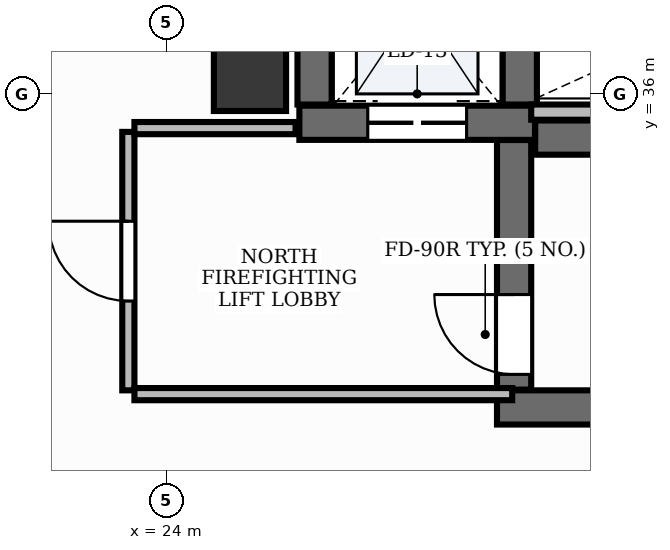
"""IFC4 building model, lengths in metres.
Left out: names, types, materials, properties, quantities, classifications, styles, units other than length and angle.
Written with IfcOpenShell. Run it as: python <this file> out.ifc"""

import sys

from ifc_helpers import new_model, si_unit, direction, frame, frame_2d, origin, origin_2d, place, context, subcontext, project, spatial, rectangle, extrude, element, fill, save


model = new_model("IFC4")
c1 = context("Model", 3, precision=1e-05, world=origin(), true_north=direction((0.0, 1.0)))
c2 = subcontext(c1, "Body", "Model", "MODEL_VIEW")
j1 = project(units=[si_unit("LENGTHUNIT", "METRE"), si_unit("PLANEANGLEUNIT", "RADIAN")], contexts=[c1])
p1 = place(None, origin())
s1 = spatial("IfcSite", under=j1, at=p1, CompositionType="ELEMENT")
p2 = place(p1, origin())
s2 = spatial("IfcBuilding", under=s1, at=p2, CompositionType="ELEMENT")
p3 = place(p2, frame((0.0, 0.0, 30.0)))
s3 = spatial("IfcBuildingStorey", under=s2, at=p3, CompositionType="ELEMENT", Elevation=30.0)
p4 = place(p3, frame((28.852, 35.425, 0.0), z_axis=(0.0, 0.0, 1.0), x_axis=(1.0, 0.0, 0.0)))
e1 = element("IfcWall", 1, at=p4, inside=s3, PredefinedType="SHEAR", context=c2, shape_type="SweptSolid", body=[
    extrude(rectangle(XDim=8.248, YDim=0.45, at=frame_2d((4.124, 0.0))), origin(), (0.0, 0.0, 1.0), 3.9),
])
p5 = place(p3, frame((28.35, 31.875, 0.0), z_axis=(0.0, 0.0, 1.0), x_axis=(1.0, 0.0, 0.0)))
e2 = element("IfcWall", 2, at=p5, inside=s3, PredefinedType="SHEAR", context=c2, shape_type="SweptSolid", body=[
    extrude(rectangle(XDim=8.75, YDim=0.45, at=frame_2d((4.375, 0.0))), origin(), (0.0, 0.0, 1.0), 3.9),
])
p6 = place(p3, frame((28.575, 32.11, 0.0), z_axis=(0.0, 0.0, 1.0), x_axis=(0.0, 1.0, 0.0)))
e3 = element("IfcWall", 3, at=p6, inside=s3, PredefinedType="SHEAR", context=c2, shape_type="SweptSolid", body=[
    extrude(rectangle(XDim=3.283, YDim=0.45, at=frame_2d((1.642, 0.0))), origin(), (0.0, 0.0, 1.0), 3.9),
])
p7 = place(p6, frame((0.2, 0.0, 0.0)))
e4 = element("IfcOpeningElement", 4, at=p7, cuts=e3, PredefinedType="OPENING", context=c2, shape_type="SweptSolid", body=[
    extrude(rectangle(XDim=1.05, YDim=2.15, at=frame_2d((0.525, 1.075))), frame((0.0, 0.24, 0.0), z_axis=(0.0, -1.0, 0.0), x_axis=(1.0, 0.0, 0.0)), (0.0, 0.0, 1.0), 0.48),
])
p8 = place(p3, frame((25.75, 35.62, 0.0), z_axis=(0.0, 0.0, 1.0), x_axis=(1.0, 0.0, 0.0)))
e5 = element("IfcWall", 5, at=p8, inside=s3, PredefinedType="SHEAR", context=c2, shape_type="SweptSolid", body=[
    extrude(rectangle(XDim=3.1, YDim=0.45, at=frame_2d((1.55, 0.0))), origin(), (0.0, 0.0, 1.0), 3.9),
])
p9 = place(p8, frame((0.9, 0.0, 0.0)))
e6 = element("IfcOpeningElement", 6, at=p9, cuts=e5, PredefinedType="OPENING", context=c2, shape_type="SweptSolid", body=[
    extrude(rectangle(XDim=1.3, YDim=2.2, at=frame_2d((0.65, 1.1))), frame((0.0, 0.24, 0.0), z_axis=(0.0, -1.0, 0.0), x_axis=(1.0, 0.0, 0.0)), (0.0, 0.0, 1.0), 0.48),
])
for number, where, z_axis, x_axis in (
    (7, (25.95, 35.86, 0.0), (0.0, 0.0, 1.0), (0.0, 1.0, 0.0)),
    (8, (28.65, 35.86, 0.0), (0.0, 0.0, 1.0), (0.0, 1.0, 0.0)),
):
    element("IfcWall", number, at=place(p3, frame(where, z_axis=z_axis, x_axis=x_axis)), inside=s3, PredefinedType="SHEAR", context=c2, shape_type="SweptSolid", body=[
        extrude(rectangle(XDim=2.7, YDim=0.45, at=frame_2d((1.35, 0.0))), origin(), (0.0, 0.0, 1.0), 3.9),
    ])
p10 = place(p3, frame((25.1, 36.25, -0.0), z_axis=(0.0, 0.0, 1.0), x_axis=(1.0, 0.0, 0.0)))
e9 = element("IfcColumn", 9, at=p10, inside=s3, PredefinedType="PILASTER", context=c2, shape_type="SweptSolid", body=[
    extrude(rectangle(XDim=0.95, YDim=0.95, at=origin_2d()), origin(), (0.0, 0.0, 1.0), 3.901),
])
p11 = place(p3, frame((28.8, 35.76, 0.0), z_axis=(0.0, 0.0, 1.0), x_axis=(1.0, 0.0, 0.0)))
e10 = element("IfcWall", 10, at=p11, inside=s3, PredefinedType="PARTITIONING", context=c2, shape_type="SweptSolid", body=[
    extrude(rectangle(XDim=4.57, YDim=0.2, at=frame_2d((2.285, 0.0))), origin(), (0.0, 0.0, 1.0), 2.91),
])
p12 = place(p3, frame((23.5, 32.1, 0.0), z_axis=(0.0, 0.0, 1.0), x_axis=(0.0, 1.0, 0.0)))
e11 = element("IfcWall", 11, at=p12, inside=s3, PredefinedType="PARTITIONING", context=c2, shape_type="SweptSolid", body=[
    extrude(rectangle(XDim=3.4, YDim=0.16, at=frame_2d((1.7, 0.0))), origin(), (0.0, 0.0, 1.0), 2.91),
])
p13 = place(p12, frame((1.175, 0.0, 0.0)))
e12 = element("IfcOpeningElement", 12, at=p13, cuts=e11, PredefinedType="OPENING", context=c2, shape_type="SweptSolid", body=[
    extrude(rectangle(XDim=1.05, YDim=2.15, at=frame_2d((0.525, 1.075))), frame((0.0, 0.095, 0.0), z_axis=(0.0, -1.0, 0.0), x_axis=(1.0, 0.0, 0.0)), (0.0, 0.0, 1.0), 0.19),
])
p14 = place(p3, frame((23.58, 32.05, 0.0), z_axis=(0.0, 0.0, 1.0), x_axis=(1.0, 0.0, 0.0)))
e13 = element("IfcWall", 13, at=p14, inside=s3, PredefinedType="PARTITIONING", context=c2, shape_type="SweptSolid", body=[
    extrude(rectangle(XDim=4.97, YDim=0.16, at=frame_2d((2.485, 0.0))), origin(), (0.0, 0.0, 1.0), 2.91),
])
p15 = place(p3, frame((23.58, 35.55, 0.0), z_axis=(0.0, 0.0, 1.0), x_axis=(1.0, 0.0, 0.0)))
e14 = element("IfcWall", 14, at=p15, inside=s3, PredefinedType="PARTITIONING", context=c2, shape_type="SweptSolid", body=[
    extrude(rectangle(XDim=2.12, YDim=0.16, at=frame_2d((1.06, 0.0))), origin(), (0.0, 0.0, 1.0), 2.91),
])
p16 = place(p7, origin())
e15 = element("IfcDoor", 15, at=p16, inside=s3, OperationType="SINGLE_SWING_RIGHT", PredefinedType="DOOR", context=c2, shape_type="SweptSolid", body=[
    extrude(rectangle(XDim=1.05, YDim=2.15, at=frame_2d((0.525, 1.075))), frame((0.0, 0.025, 0.0), z_axis=(0.0, -1.0, 0.0), x_axis=(1.0, 0.0, 0.0)), (0.0, 0.0, 1.0), 0.05),
])
fill(e4, e15)
p17 = place(p9, origin())
e16 = element("IfcDoor", 16, at=p17, inside=s3, OperationType="DOUBLE_DOOR_SLIDING", PredefinedType="DOOR", context=c2, shape_type="SweptSolid", body=[
    extrude(rectangle(XDim=1.3, YDim=2.2, at=frame_2d((0.65, 1.1))), frame((0.0, 0.025, 0.0), z_axis=(0.0, -1.0, 0.0), x_axis=(1.0, 0.0, 0.0)), (0.0, 0.0, 1.0), 0.05),
])
fill(e6, e16)
p18 = place(p13, origin())
e17 = element("IfcDoor", 17, at=p18, inside=s3, OperationType="SINGLE_SWING_RIGHT", PredefinedType="DOOR", context=c2, shape_type="SweptSolid", body=[
    extrude(rectangle(XDim=1.05, YDim=2.15, at=frame_2d((0.525, 1.075))), frame((0.0, 0.025, 0.0), z_axis=(0.0, -1.0, 0.0), x_axis=(1.0, 0.0, 0.0)), (0.0, 0.0, 1.0), 0.05),
])
fill(e12, e17)
save(model, sys.argv[1])
